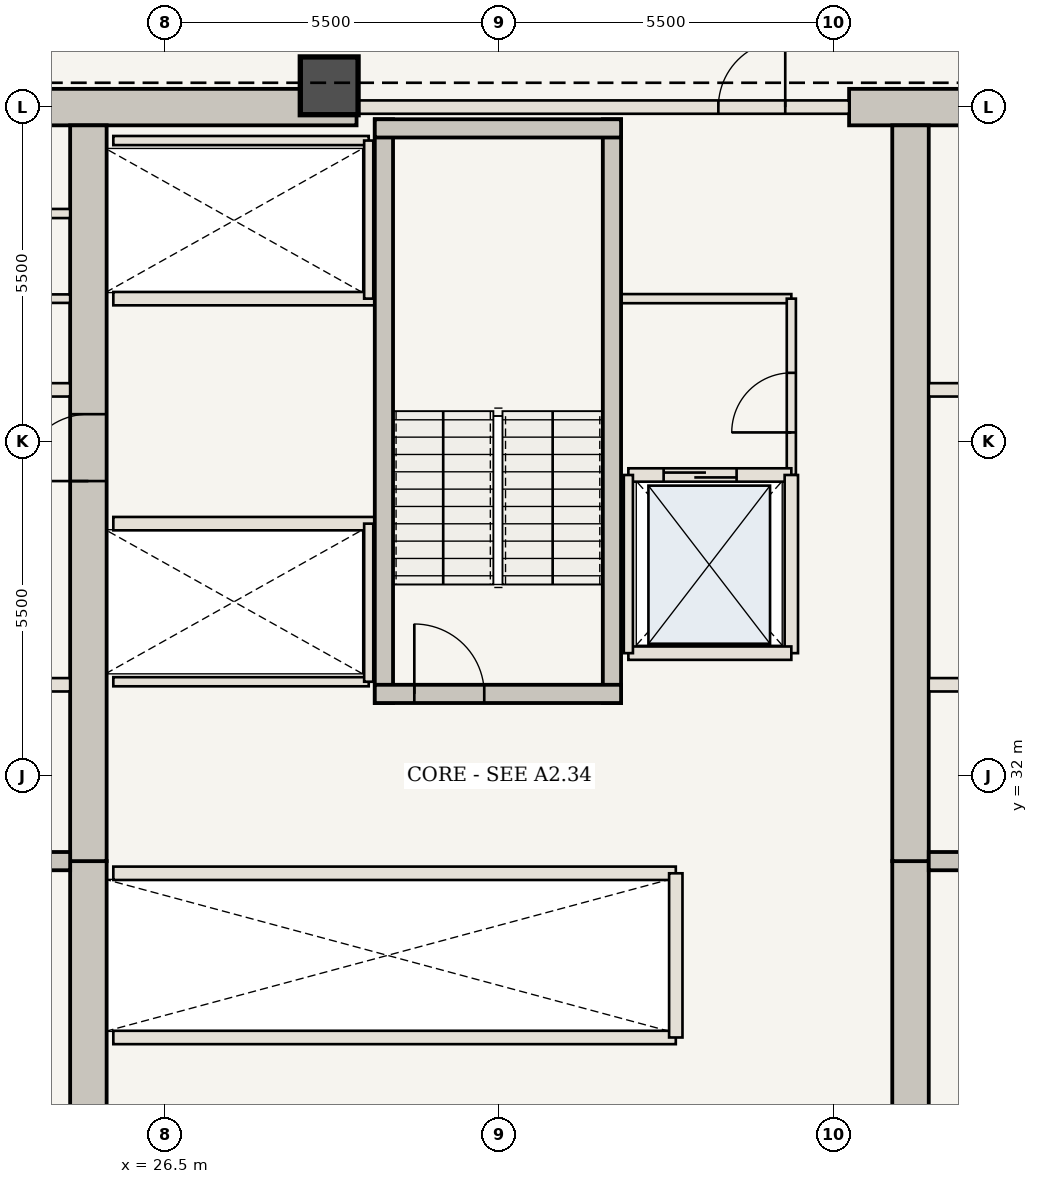
"""IFC4 building model, lengths in metres.
Left out: names, types, materials, properties, quantities, classifications, styles, units other than length and angle.
Written with IfcOpenShell. Run it as: python <this file> out.ifc"""

import sys

from ifc_helpers import new_model, si_unit, direction, frame, frame_2d, origin, origin_2d, place, context, subcontext, project, spatial, rectangle, extrude, element, fill, save


model = new_model("IFC4")
c1 = context("Model", 3, precision=1e-05, world=origin(), true_north=direction((0.0, 1.0)))
c2 = subcontext(c1, "Body", "Model", "MODEL_VIEW")
j1 = project(units=[si_unit("LENGTHUNIT", "METRE"), si_unit("PLANEANGLEUNIT", "RADIAN")], contexts=[c1])
p1 = place(None, origin())
s1 = spatial("IfcSite", under=j1, at=p1, CompositionType="ELEMENT")
p2 = place(p1, origin())
s2 = spatial("IfcBuilding", under=s1, at=p2, CompositionType="ELEMENT")
p3 = place(p2, frame((0.0, 0.0, 145.25)))
s3 = spatial("IfcBuildingStorey", under=s2, at=p3, CompositionType="ELEMENT", Elevation=145.25)
p4 = place(p3, frame((21.41, 43.0, 0.0), z_axis=(0.0, 0.0, 1.0), x_axis=(1.0, 0.0, 0.0)))
e1 = element("IfcWall", 1, at=p4, inside=s3, PredefinedType="SHEAR", context=c2, shape_type="SweptSolid", body=[
    extrude(rectangle(XDim=8.24, YDim=0.6, at=frame_2d((4.12, 0.0))), origin(), (0.0, 0.0, 1.0), 3.85),
])
p5 = place(p3, frame((37.75, 43.0, 0.0), z_axis=(0.0, 0.0, 1.0), x_axis=(1.0, 0.0, 0.0)))
e2 = element("IfcWall", 2, at=p5, inside=s3, PredefinedType="SHEAR", context=c2, shape_type="SweptSolid", body=[
    extrude(rectangle(XDim=4.84, YDim=0.6, at=frame_2d((2.42, 0.0))), origin(), (0.0, 0.0, 1.0), 3.85),
])
p6 = place(p3, frame((25.24, 21.25, 0.0), z_axis=(0.0, 0.0, 1.0), x_axis=(0.0, 1.0, 0.0)))
e3 = element("IfcWall", 3, at=p6, inside=s3, PredefinedType="SHEAR", context=c2, shape_type="SweptSolid", body=[
    extrude(rectangle(XDim=9.35, YDim=0.6, at=frame_2d((4.675, 0.0))), origin(), (0.0, 0.0, 1.0), 3.85),
])
p7 = place(p3, frame((25.24, 30.6, 0.0), z_axis=(0.0, 0.0, 1.0), x_axis=(0.0, 1.0, 0.0)))
e4 = element("IfcWall", 4, at=p7, inside=s3, PredefinedType="SHEAR", context=c2, shape_type="SweptSolid", body=[
    extrude(rectangle(XDim=12.1, YDim=0.6, at=frame_2d((6.05, 0.0))), origin(), (0.0, 0.0, 1.0), 3.85),
])
p8 = place(p7, frame((6.25, 0.0, 0.0)))
e5 = element("IfcOpeningElement", 5, at=p8, cuts=e4, PredefinedType="OPENING", context=c2, shape_type="SweptSolid", body=[
    extrude(rectangle(XDim=1.1, YDim=2.15, at=frame_2d((0.55, 1.075))), frame((0.0, 0.31, 0.0), z_axis=(0.0, -1.0, 0.0), x_axis=(1.0, 0.0, 0.0)), (0.0, 0.0, 1.0), 0.62),
])
p9 = place(p3, frame((38.76, 21.25, 0.0), z_axis=(0.0, 0.0, 1.0), x_axis=(0.0, 1.0, 0.0)))
e6 = element("IfcWall", 6, at=p9, inside=s3, PredefinedType="SHEAR", context=c2, shape_type="SweptSolid", body=[
    extrude(rectangle(XDim=9.35, YDim=0.6, at=frame_2d((4.675, 0.0))), origin(), (0.0, 0.0, 1.0), 3.85),
])
p10 = place(p3, frame((38.76, 30.6, 0.0), z_axis=(0.0, 0.0, 1.0), x_axis=(0.0, 1.0, 0.0)))
e7 = element("IfcWall", 7, at=p10, inside=s3, PredefinedType="SHEAR", context=c2, shape_type="SweptSolid", body=[
    extrude(rectangle(XDim=12.1, YDim=0.6, at=frame_2d((6.05, 0.0))), origin(), (0.0, 0.0, 1.0), 3.85),
])
p11 = place(p3, frame((29.2, 43.35, 0.0), z_axis=(0.0, 0.0, 1.0), x_axis=(1.0, 0.0, 0.0)))
e8 = element("IfcColumn", 8, at=p11, inside=s3, PredefinedType="COLUMN", context=c2, shape_type="SweptSolid", body=[
    extrude(rectangle(XDim=0.95, YDim=0.95, at=origin_2d()), origin(), (0.0, 0.0, 1.0), 3.85),
])
for number, where, z_axis, x_axis in (
    (9, (21.41, 30.6, 0.0), (0.0, 0.0, 1.0), (1.0, 0.0, 0.0)),
    (10, (39.06, 30.6, 0.0), (0.0, 0.0, 1.0), (1.0, 0.0, 0.0)),
):
    element("IfcWall", number, at=place(p3, frame(where, z_axis=z_axis, x_axis=x_axis)), inside=s3, PredefinedType="SHEAR", context=c2, shape_type="SweptSolid", body=[
        extrude(rectangle(XDim=3.53, YDim=0.3, at=frame_2d((1.765, 0.0))), origin(), (0.0, 0.0, 1.0), 3.685),
    ])
p12 = place(p3, frame((21.41, 33.5, 0.0), z_axis=(0.0, 0.0, 1.0), x_axis=(1.0, 0.0, 0.0)))
e11 = element("IfcWall", 11, at=p12, inside=s3, PredefinedType="STANDARD", context=c2, shape_type="SweptSolid", body=[
    extrude(rectangle(XDim=3.53, YDim=0.22, at=frame_2d((1.765, 0.0))), origin(), (0.0, 0.0, 1.0), 3.685),
])
p13 = place(p12, frame((0.75, 0.0, 0.0)))
e12 = element("IfcOpeningElement", 12, at=p13, cuts=e11, PredefinedType="OPENING", context=c2, shape_type="SweptSolid", body=[
    extrude(rectangle(XDim=1.2, YDim=2.2, at=frame_2d((0.6, 1.1))), frame((0.0, 0.12, 0.0), z_axis=(0.0, -1.0, 0.0), x_axis=(1.0, 0.0, 0.0)), (0.0, 0.0, 1.0), 0.24),
])
p14 = place(p3, frame((39.06, 33.5, 0.0), z_axis=(0.0, 0.0, 1.0), x_axis=(1.0, 0.0, 0.0)))
e13 = element("IfcWall", 13, at=p14, inside=s3, PredefinedType="STANDARD", context=c2, shape_type="SweptSolid", body=[
    extrude(rectangle(XDim=3.53, YDim=0.22, at=frame_2d((1.765, 0.0))), origin(), (0.0, 0.0, 1.0), 3.685),
])
p15 = place(p14, frame((1.55, 0.0, 0.0)))
e14 = element("IfcOpeningElement", 14, at=p15, cuts=e13, PredefinedType="OPENING", context=c2, shape_type="SweptSolid", body=[
    extrude(rectangle(XDim=1.2, YDim=2.2, at=frame_2d((0.6, 1.1))), frame((0.0, 0.12, 0.0), z_axis=(0.0, -1.0, 0.0), x_axis=(1.0, 0.0, 0.0)), (0.0, 0.0, 1.0), 0.24),
])
for number, where, z_axis, x_axis in (
    (15, (21.41, 38.35, 0.0), (0.0, 0.0, 1.0), (1.0, 0.0, 0.0)),
    (16, (39.06, 38.35, 0.0), (0.0, 0.0, 1.0), (1.0, 0.0, 0.0)),
):
    element("IfcWall", number, at=place(p3, frame(where, z_axis=z_axis, x_axis=x_axis)), inside=s3, PredefinedType="STANDARD", context=c2, shape_type="SweptSolid", body=[
        extrude(rectangle(XDim=3.53, YDim=0.22, at=frame_2d((1.765, 0.0))), origin(), (0.0, 0.0, 1.0), 3.685),
    ])
p16 = place(p3, frame((21.41, 39.85, 0.0), z_axis=(0.0, 0.0, 1.0), x_axis=(1.0, 0.0, 0.0)))
e17 = element("IfcWall", 17, at=p16, inside=s3, PredefinedType="STANDARD", context=c2, shape_type="SweptSolid", body=[
    extrude(rectangle(XDim=3.53, YDim=0.14, at=frame_2d((1.765, 0.0))), origin(), (0.0, 0.0, 1.0), 3.685),
])
p17 = place(p3, frame((21.41, 41.25, 0.0), z_axis=(0.0, 0.0, 1.0), x_axis=(1.0, 0.0, 0.0)))
e18 = element("IfcWall", 18, at=p17, inside=s3, PredefinedType="STANDARD", context=c2, shape_type="SweptSolid", body=[
    extrude(rectangle(XDim=3.53, YDim=0.15, at=frame_2d((1.765, 0.0))), origin(), (0.0, 0.0, 1.0), 3.685),
])
p18 = place(p3, frame((34.0, 39.85, 0.0), z_axis=(0.0, 0.0, 1.0), x_axis=(1.0, 0.0, 0.0)))
e19 = element("IfcWall", 19, at=p18, inside=s3, PredefinedType="STANDARD", context=c2, shape_type="SweptSolid", body=[
    extrude(rectangle(XDim=2.8, YDim=0.15, at=frame_2d((1.4, 0.0))), origin(), (0.0, 0.0, 1.0), 3.685),
])
p19 = place(p3, frame((36.8, 36.95, 0.0), z_axis=(0.0, 0.0, 1.0), x_axis=(0.0, 1.0, 0.0)))
e20 = element("IfcWall", 20, at=p19, inside=s3, PredefinedType="STANDARD", context=c2, shape_type="SweptSolid", body=[
    extrude(rectangle(XDim=2.9, YDim=0.15, at=frame_2d((1.45, 0.0))), origin(), (0.0, 0.0, 1.0), 3.685),
])
p20 = place(p19, frame((0.7, 0.0, 0.0)))
e21 = element("IfcOpeningElement", 21, at=p20, cuts=e20, PredefinedType="OPENING", context=c2, shape_type="SweptSolid", body=[
    extrude(rectangle(XDim=0.98, YDim=2.2, at=frame_2d((0.49, 1.1))), frame((0.0, 0.085, 0.0), z_axis=(0.0, -1.0, 0.0), x_axis=(1.0, 0.0, 0.0)), (0.0, 0.0, 1.0), 0.17),
])
for number, where, z_axis, x_axis in (
    (22, (25.65, 27.7, 0.0), (0.0, 0.0, 1.0), (1.0, 0.0, 0.0)),
    (23, (25.65, 30.4, 0.0), (0.0, 0.0, 1.0), (1.0, 0.0, 0.0)),
):
    element("IfcWall", number, at=place(p3, frame(where, z_axis=z_axis, x_axis=x_axis)), inside=s3, PredefinedType="STANDARD", context=c2, shape_type="SweptSolid", body=[
        extrude(rectangle(XDim=9.25, YDim=0.22, at=frame_2d((4.625, 0.0))), origin(), (0.0, 0.0, 1.0), 3.685),
    ])
p21 = place(p3, frame((34.9, 27.7, 0.0), z_axis=(0.0, 0.0, 1.0), x_axis=(0.0, 1.0, 0.0)))
e24 = element("IfcWall", 24, at=p21, inside=s3, PredefinedType="STANDARD", context=c2, shape_type="SweptSolid", body=[
    extrude(rectangle(XDim=2.7, YDim=0.22, at=frame_2d((1.35, 0.0))), origin(), (0.0, 0.0, 1.0), 3.685),
])
p22 = place(p3, frame((25.65, 36.15, 0.0), z_axis=(0.0, 0.0, 1.0), x_axis=(1.0, 0.0, 0.0)))
e25 = element("IfcWall", 25, at=p22, inside=s3, PredefinedType="STANDARD", context=c2, shape_type="SweptSolid", body=[
    extrude(rectangle(XDim=4.3, YDim=0.22, at=frame_2d((2.15, 0.0))), origin(), (0.0, 0.0, 1.0), 3.685),
])
p23 = place(p3, frame((25.65, 33.55, 0.0), z_axis=(0.0, 0.0, 1.0), x_axis=(1.0, 0.0, 0.0)))
e26 = element("IfcWall", 26, at=p23, inside=s3, PredefinedType="STANDARD", context=c2, shape_type="SweptSolid", body=[
    extrude(rectangle(XDim=4.2, YDim=0.15, at=frame_2d((2.1, 0.0))), origin(), (0.0, 0.0, 1.0), 3.685),
])
p24 = place(p3, frame((29.85, 33.55, 0.0), z_axis=(0.0, 0.0, 1.0), x_axis=(0.0, 1.0, 0.0)))
e27 = element("IfcWall", 27, at=p24, inside=s3, PredefinedType="STANDARD", context=c2, shape_type="SweptSolid", body=[
    extrude(rectangle(XDim=2.6, YDim=0.15, at=frame_2d((1.3, 0.0))), origin(), (0.0, 0.0, 1.0), 3.685),
])
p25 = place(p3, frame((25.65, 39.85, 0.0), z_axis=(0.0, 0.0, 1.0), x_axis=(1.0, 0.0, 0.0)))
e28 = element("IfcWall", 28, at=p25, inside=s3, PredefinedType="STANDARD", context=c2, shape_type="SweptSolid", body=[
    extrude(rectangle(XDim=4.3, YDim=0.22, at=frame_2d((2.15, 0.0))), origin(), (0.0, 0.0, 1.0), 3.685),
])
p26 = place(p3, frame((25.65, 42.45, 0.0), z_axis=(0.0, 0.0, 1.0), x_axis=(1.0, 0.0, 0.0)))
e29 = element("IfcWall", 29, at=p26, inside=s3, PredefinedType="STANDARD", context=c2, shape_type="SweptSolid", body=[
    extrude(rectangle(XDim=4.2, YDim=0.15, at=frame_2d((2.1, 0.0))), origin(), (0.0, 0.0, 1.0), 3.685),
])
p27 = place(p3, frame((29.85, 39.85, 0.0), z_axis=(0.0, 0.0, 1.0), x_axis=(0.0, 1.0, 0.0)))
e30 = element("IfcWall", 30, at=p27, inside=s3, PredefinedType="STANDARD", context=c2, shape_type="SweptSolid", body=[
    extrude(rectangle(XDim=2.6, YDim=0.15, at=frame_2d((1.3, 0.0))), origin(), (0.0, 0.0, 1.0), 3.685),
])
for number, where, z_axis, x_axis in (
    (31, (30.1, 33.2, 0.0), (0.0, 0.0, 1.0), (0.0, 1.0, 0.0)),
    (32, (33.85, 33.2, 0.0), (0.0, 0.0, 1.0), (0.0, 1.0, 0.0)),
):
    element("IfcWall", number, at=place(p3, frame(where, z_axis=z_axis, x_axis=x_axis)), inside=s3, PredefinedType="SHEAR", context=c2, shape_type="SweptSolid", body=[
        extrude(rectangle(XDim=9.6, YDim=0.3, at=frame_2d((4.8, 0.0))), origin(), (0.0, 0.0, 1.0), 3.685),
    ])
p28 = place(p3, frame((29.95, 33.35, 0.0), z_axis=(0.0, 0.0, 1.0), x_axis=(1.0, 0.0, 0.0)))
e33 = element("IfcWall", 33, at=p28, inside=s3, PredefinedType="SHEAR", context=c2, shape_type="SweptSolid", body=[
    extrude(rectangle(XDim=4.05, YDim=0.3, at=frame_2d((2.025, 0.0))), origin(), (0.0, 0.0, 1.0), 3.685),
])
p29 = place(p28, frame((0.65, 0.0, 0.0)))
e34 = element("IfcOpeningElement", 34, at=p29, cuts=e33, PredefinedType="OPENING", context=c2, shape_type="SweptSolid", body=[
    extrude(rectangle(XDim=1.15, YDim=2.15, at=frame_2d((0.575, 1.075))), frame((0.0, 0.16, 0.0), z_axis=(0.0, -1.0, 0.0), x_axis=(1.0, 0.0, 0.0)), (0.0, 0.0, 1.0), 0.32),
])
p30 = place(p3, frame((29.95, 42.65, 0.0), z_axis=(0.0, 0.0, 1.0), x_axis=(1.0, 0.0, 0.0)))
e35 = element("IfcWall", 35, at=p30, inside=s3, PredefinedType="SHEAR", context=c2, shape_type="SweptSolid", body=[
    extrude(rectangle(XDim=4.05, YDim=0.3, at=frame_2d((2.025, 0.0))), origin(), (0.0, 0.0, 1.0), 3.685),
])
p31 = place(p3, frame((29.65, 43.0, 0.0), z_axis=(0.0, 0.0, 1.0), x_axis=(1.0, 0.0, 0.0)))
e36 = element("IfcWall", 36, at=p31, inside=s3, PredefinedType="STANDARD", context=c2, shape_type="SweptSolid", body=[
    extrude(rectangle(XDim=8.1, YDim=0.22, at=frame_2d((4.05, 0.0))), origin(), (0.0, 0.0, 1.0), 3.685),
])
p32 = place(p31, frame((5.95, 0.0, 0.0)))
e37 = element("IfcOpeningElement", 37, at=p32, cuts=e36, PredefinedType="OPENING", context=c2, shape_type="SweptSolid", body=[
    extrude(rectangle(XDim=1.1, YDim=2.15, at=frame_2d((0.55, 1.075))), frame((0.0, 0.12, 0.0), z_axis=(0.0, -1.0, 0.0), x_axis=(1.0, 0.0, 0.0)), (0.0, 0.0, 1.0), 0.24),
])
p33 = place(p3, frame((34.12, 36.95, 0.0), z_axis=(0.0, 0.0, 1.0), x_axis=(1.0, 0.0, 0.0)))
e38 = element("IfcWall", 38, at=p33, inside=s3, PredefinedType="STANDARD", context=c2, shape_type="SweptSolid", body=[
    extrude(rectangle(XDim=2.68, YDim=0.22, at=frame_2d((1.34, 0.0))), origin(), (0.0, 0.0, 1.0), 3.685),
])
p34 = place(p33, frame((0.58, 0.0, 0.0)))
e39 = element("IfcOpeningElement", 39, at=p34, cuts=e38, PredefinedType="OPENING", context=c2, shape_type="SweptSolid", body=[
    extrude(rectangle(XDim=1.2, YDim=2.2, at=frame_2d((0.6, 1.1))), frame((0.0, 0.12, 0.0), z_axis=(0.0, -1.0, 0.0), x_axis=(1.0, 0.0, 0.0)), (0.0, 0.0, 1.0), 0.24),
])
p35 = place(p3, frame((36.8, 34.02, 0.0), z_axis=(0.0, 0.0, 1.0), x_axis=(0.0, 1.0, 0.0)))
e40 = element("IfcWall", 40, at=p35, inside=s3, PredefinedType="STANDARD", context=c2, shape_type="SweptSolid", body=[
    extrude(rectangle(XDim=2.93, YDim=0.22, at=frame_2d((1.465, 0.0))), origin(), (0.0, 0.0, 1.0), 3.685),
])
p36 = place(p3, frame((34.12, 34.02, 0.0), z_axis=(0.0, 0.0, 1.0), x_axis=(1.0, 0.0, 0.0)))
e41 = element("IfcWall", 41, at=p36, inside=s3, PredefinedType="STANDARD", context=c2, shape_type="SweptSolid", body=[
    extrude(rectangle(XDim=2.68, YDim=0.22, at=frame_2d((1.34, 0.0))), origin(), (0.0, 0.0, 1.0), 3.685),
])
p37 = place(p3, frame((34.12, 34.02, 0.0), z_axis=(0.0, 0.0, 1.0), x_axis=(0.0, 1.0, 0.0)))
e42 = element("IfcWall", 42, at=p37, inside=s3, PredefinedType="STANDARD", context=c2, shape_type="SweptSolid", body=[
    extrude(rectangle(XDim=2.93, YDim=0.15, at=frame_2d((1.465, 0.0))), origin(), (0.0, 0.0, 1.0), 3.685),
])
p38 = place(p8, origin())
e43 = element("IfcDoor", 43, at=p38, inside=s3, OperationType="SINGLE_SWING_LEFT", PredefinedType="DOOR", context=c2, shape_type="SweptSolid", body=[
    extrude(rectangle(XDim=1.1, YDim=2.15, at=frame_2d((0.55, 1.075))), frame((0.0, 0.025, 0.0), z_axis=(0.0, -1.0, 0.0), x_axis=(1.0, 0.0, 0.0)), (0.0, 0.0, 1.0), 0.05),
])
fill(e5, e43)
p39 = place(p20, origin())
e44 = element("IfcDoor", 44, at=p39, inside=s3, OperationType="SINGLE_SWING_LEFT", PredefinedType="DOOR", context=c2, shape_type="SweptSolid", body=[
    extrude(rectangle(XDim=0.98, YDim=2.2, at=frame_2d((0.49, 1.1))), frame((0.0, 0.025, 0.0), z_axis=(0.0, -1.0, 0.0), x_axis=(1.0, 0.0, 0.0)), (0.0, 0.0, 1.0), 0.05),
])
fill(e21, e44)
p40 = place(p29, origin())
e45 = element("IfcDoor", 45, at=p40, inside=s3, OperationType="SINGLE_SWING_LEFT", PredefinedType="DOOR", context=c2, shape_type="SweptSolid", body=[
    extrude(rectangle(XDim=1.15, YDim=2.15, at=frame_2d((0.575, 1.075))), frame((0.0, 0.025, 0.0), z_axis=(0.0, -1.0, 0.0), x_axis=(1.0, 0.0, 0.0)), (0.0, 0.0, 1.0), 0.05),
])
fill(e34, e45)
p41 = place(p32, origin())
e46 = element("IfcDoor", 46, at=p41, inside=s3, OperationType="SINGLE_SWING_RIGHT", PredefinedType="DOOR", context=c2, shape_type="SweptSolid", body=[
    extrude(rectangle(XDim=1.1, YDim=2.15, at=frame_2d((0.55, 1.075))), frame((0.0, 0.025, 0.0), z_axis=(0.0, -1.0, 0.0), x_axis=(1.0, 0.0, 0.0)), (0.0, 0.0, 1.0), 0.05),
])
fill(e37, e46)
p42 = place(p34, origin())
e47 = element("IfcDoor", 47, at=p42, inside=s3, OperationType="DOUBLE_DOOR_SLIDING", PredefinedType="DOOR", context=c2, shape_type="SweptSolid", body=[
    extrude(rectangle(XDim=1.2, YDim=2.2, at=frame_2d((0.6, 1.1))), frame((0.0, 0.025, 0.0), z_axis=(0.0, -1.0, 0.0), x_axis=(1.0, 0.0, 0.0)), (0.0, 0.0, 1.0), 0.05),
])
fill(e39, e47)
save(model, sys.argv[1])
